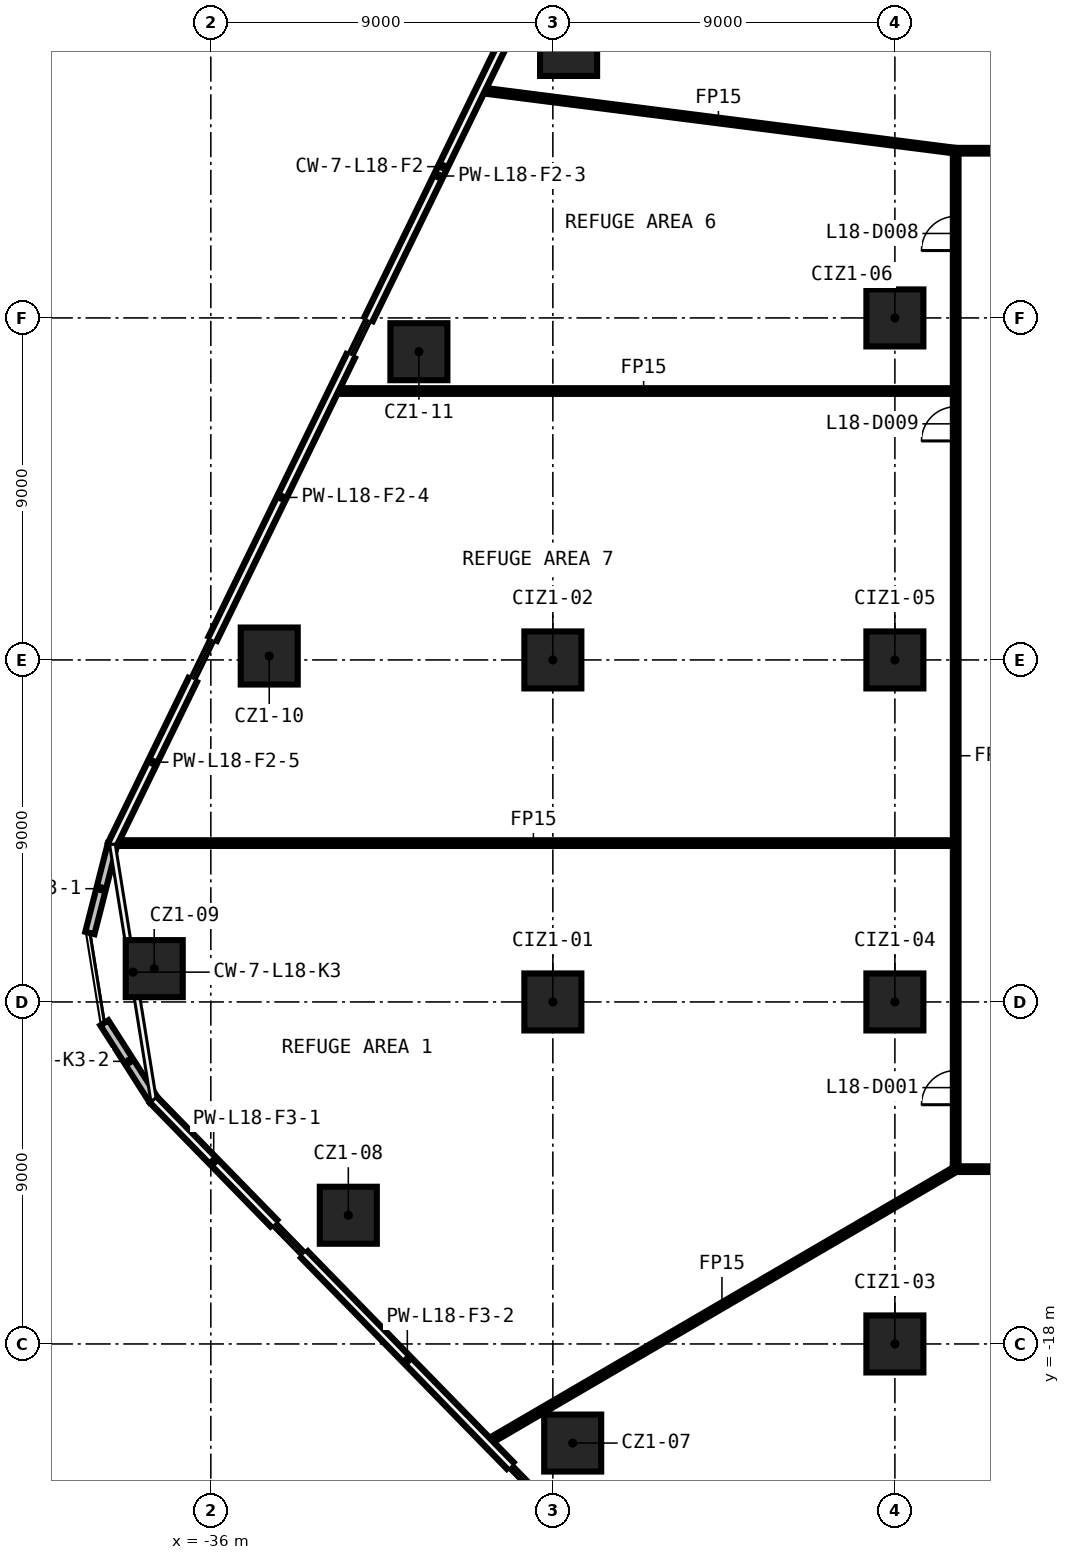
"""IFC4 building model, lengths in metres.
Left out: names, types, materials, properties, quantities, classifications, styles, units other than length and angle.
Written with IfcOpenShell. Run it as: python <this file> out.ifc"""

import sys

from ifc_helpers import new_model, si_unit, direction, frame, frame_2d, origin, origin_2d, place, context, subcontext, project, spatial, rectangle, extrude, element, fill, save


model = new_model("IFC4")
c1 = context("Model", 3, precision=1e-05, world=origin(), true_north=direction((0.0, 1.0)))
c2 = subcontext(c1, "Body", "Model", "MODEL_VIEW")
j1 = project(units=[si_unit("LENGTHUNIT", "METRE"), si_unit("PLANEANGLEUNIT", "RADIAN")], contexts=[c1])
p1 = place(None, origin())
s1 = spatial("IfcSite", under=j1, at=p1, CompositionType="ELEMENT")
p2 = place(p1, origin())
s2 = spatial("IfcBuilding", under=s1, at=p2, CompositionType="ELEMENT")
p3 = place(p2, frame((0.0, 0.0, 89.2)))
s3 = spatial("IfcBuildingStorey", under=s2, at=p3, CompositionType="ELEMENT", Elevation=89.2)
for number, where, z_axis, x_axis in (
    (1, (-26.478, -20.608, 0.0), (0.0, 0.0, 1.0), (1.0, 0.0, 0.0)),
    (2, (-32.382, -14.613, 0.0), (0.0, 0.0, 1.0), (1.0, 0.0, 0.0)),
    (3, (-37.489, -8.123, 0.0), (0.0, 0.0, 1.0), (1.0, 0.0, 0.0)),
    (4, (-34.463, 0.103, 0.0), (0.0, 0.0, 1.0), (1.0, 0.0, 0.0)),
    (5, (-30.525, 8.111, 0.0), (0.0, 0.0, 1.0), (1.0, 0.0, 0.0)),
    (6, (-26.586, 16.118, 0.0), (0.0, 0.0, 1.0), (1.0, 0.0, 0.0)),
    (7, (-27.0, -9.0, 0.0), (0.0, 0.0, 1.0), (1.0, 0.0, 0.0)),
    (8, (-27.0, 0.0, 0.0), (0.0, 0.0, 1.0), (1.0, 0.0, 0.0)),
    (9, (-18.0, -18.0, 0.0), (0.0, 0.0, 1.0), (1.0, 0.0, 0.0)),
    (10, (-18.0, -9.0, 0.0), (0.0, 0.0, 1.0), (1.0, 0.0, 0.0)),
    (11, (-18.0, 0.0, 0.0), (0.0, 0.0, 1.0), (1.0, 0.0, 0.0)),
    (12, (-18.0, 9.0, 0.0), (0.0, 0.0, 1.0), (1.0, 0.0, 0.0)),
):
    element("IfcColumn", number, at=place(p3, frame(where, z_axis=z_axis, x_axis=x_axis)), inside=s3, PredefinedType="COLUMN", context=c2, shape_type="SweptSolid", body=[
        extrude(rectangle(XDim=1.5, YDim=1.5, at=origin_2d()), origin(), (0.0, 0.0, 1.0), 5.55),
    ])
p4 = place(p3, frame((16.475, -13.4, 0.0), z_axis=(0.0, 0.0, 1.0), x_axis=(-1.0, 0.0, 0.0)))
e13 = element("IfcWall", 13, at=p4, inside=s3, PredefinedType="PARTITIONING", context=c2, shape_type="SweptSolid", body=[
    extrude(rectangle(XDim=32.95, YDim=0.15, at=frame_2d((16.475, 0.0))), origin(), (0.0, 0.0, 1.0), 5.55),
])
p5 = place(p4, frame((19.203, 0.0, 0.0)))
e14 = element("IfcOpeningElement", 14, at=p5, cuts=e13, PredefinedType="OPENING", context=c2, shape_type="SweptSolid", body=[
    extrude(rectangle(XDim=0.9, YDim=2.1, at=frame_2d((0.45, 1.05))), frame((0.0, 0.085, 0.0), z_axis=(0.0, -1.0, 0.0), x_axis=(1.0, 0.0, 0.0)), (0.0, 0.0, 1.0), 0.17),
])
p6 = place(p4, frame((2.192, 0.0, 0.0)))
e15 = element("IfcOpeningElement", 15, at=p6, cuts=e13, PredefinedType="OPENING", context=c2, shape_type="SweptSolid", body=[
    extrude(rectangle(XDim=0.9, YDim=2.1, at=frame_2d((0.45, 1.05))), frame((0.0, 0.085, 0.0), z_axis=(0.0, -1.0, 0.0), x_axis=(1.0, 0.0, 0.0)), (0.0, 0.0, 1.0), 0.17),
])
p7 = place(p3, frame((-38.55, -4.82, 0.0), z_axis=(0.0, 0.0, 1.0), x_axis=(1.0, 0.0, 0.0)))
e16 = element("IfcWall", 16, at=p7, inside=s3, PredefinedType="PARTITIONING", context=c2, shape_type="SweptSolid", body=[
    extrude(rectangle(XDim=22.075, YDim=0.15, at=frame_2d((11.037, 0.0))), origin(), (0.0, 0.0, 1.0), 5.55),
])
p8 = place(p3, frame((-32.748, 7.076, 0.0), z_axis=(0.0, 0.0, 1.0), x_axis=(1.0, 0.0, 0.0)))
e17 = element("IfcWall", 17, at=p8, inside=s3, PredefinedType="PARTITIONING", context=c2, shape_type="SweptSolid", body=[
    extrude(rectangle(XDim=16.273, YDim=0.15, at=frame_2d((8.137, 0.0))), origin(), (0.0, 0.0, 1.0), 5.55),
])
p9 = place(p3, frame((-16.475, 13.4, 0.0), z_axis=(0.0, 0.0, 1.0), x_axis=(1.0, 0.0, 0.0)))
e18 = element("IfcWall", 18, at=p9, inside=s3, PredefinedType="PARTITIONING", context=c2, shape_type="SweptSolid", body=[
    extrude(rectangle(XDim=32.95, YDim=0.15, at=frame_2d((16.475, 0.0))), origin(), (0.0, 0.0, 1.0), 5.55),
])
p10 = place(p9, frame((28.958, 0.0, 0.0)))
e19 = element("IfcOpeningElement", 19, at=p10, cuts=e18, PredefinedType="OPENING", context=c2, shape_type="SweptSolid", body=[
    extrude(rectangle(XDim=0.9, YDim=2.1, at=frame_2d((0.45, 1.05))), frame((0.0, 0.085, 0.0), z_axis=(0.0, -1.0, 0.0), x_axis=(1.0, 0.0, 0.0)), (0.0, 0.0, 1.0), 0.17),
])
p11 = place(p3, frame((-28.702, -20.577, 0.0), z_axis=(0.0, 0.0, 1.0), x_axis=(0.863745948182, 0.503927511652, 0.0)))
e20 = element("IfcWall", 20, at=p11, inside=s3, PredefinedType="PARTITIONING", context=c2, shape_type="SweptSolid", body=[
    extrude(rectangle(XDim=14.243, YDim=0.15, at=frame_2d((7.121, 0.0))), origin(), (0.0, 0.0, 1.0), 5.55),
])
p12 = place(p3, frame((-16.4, -13.325, 0.0), z_axis=(0.0, 0.0, 1.0), x_axis=(0.0, 1.0, 0.0)))
e21 = element("IfcWall", 21, at=p12, inside=s3, PredefinedType="PARTITIONING", context=c2, shape_type="SweptSolid", body=[
    extrude(rectangle(XDim=26.65, YDim=0.15, at=frame_2d((13.325, 0.0))), origin(), (0.0, 0.0, 1.0), 5.55),
])
p13 = place(p12, frame((1.621, 0.0, 0.0)))
e22 = element("IfcOpeningElement", 22, at=p13, cuts=e21, PredefinedType="OPENING", context=c2, shape_type="SweptSolid", body=[
    extrude(rectangle(XDim=0.9, YDim=2.1, at=frame_2d((0.45, 1.05))), frame((0.0, 0.085, 0.0), z_axis=(0.0, -1.0, 0.0), x_axis=(1.0, 0.0, 0.0)), (0.0, 0.0, 1.0), 0.17),
])
p14 = place(p12, frame((24.098, 0.0, 0.0)))
e23 = element("IfcOpeningElement", 23, at=p14, cuts=e21, PredefinedType="OPENING", context=c2, shape_type="SweptSolid", body=[
    extrude(rectangle(XDim=0.9, YDim=2.1, at=frame_2d((0.45, 1.05))), frame((0.0, 0.085, 0.0), z_axis=(0.0, -1.0, 0.0), x_axis=(1.0, 0.0, 0.0)), (0.0, 0.0, 1.0), 0.17),
])
p15 = place(p12, frame((19.088, 0.0, 0.0)))
e24 = element("IfcOpeningElement", 24, at=p15, cuts=e21, PredefinedType="OPENING", context=c2, shape_type="SweptSolid", body=[
    extrude(rectangle(XDim=0.9, YDim=2.1, at=frame_2d((0.45, 1.05))), frame((0.0, 0.085, 0.0), z_axis=(0.0, -1.0, 0.0), x_axis=(1.0, 0.0, 0.0)), (0.0, 0.0, 1.0), 0.17),
])
p16 = place(p3, frame((-28.888, 14.991, 0.0), z_axis=(0.0, 0.0, 1.0), x_axis=(0.991981829528, -0.126380575588, 0.0)))
e25 = element("IfcWall", 25, at=p16, inside=s3, PredefinedType="PARTITIONING", context=c2, shape_type="SweptSolid", body=[
    extrude(rectangle(XDim=12.589, YDim=0.15, at=frame_2d((6.295, 0.0))), origin(), (0.0, 0.0, 1.0), 5.55),
])
p17 = place(p3, frame((-28.175, 16.5, 0.0), z_axis=(0.0, 0.0, 1.0), x_axis=(-0.438332337133, -0.898812973996, 0.0)))
e26 = element("IfcWall", 26, at=p17, inside=s3, PredefinedType="SOLIDWALL", context=c2, shape_type="SweptSolid", body=[
    extrude(rectangle(XDim=8.377, YDim=0.25, at=frame_2d((4.189, 0.0))), origin(), (0.0, 0.0, 1.0), 5.55),
])
p18 = place(p3, frame((-32.322, 7.996, 0.0), z_axis=(0.0, 0.0, 1.0), x_axis=(-0.438317846938, -0.898820040417, 0.0)))
e27 = element("IfcWall", 27, at=p18, inside=s3, PredefinedType="SOLIDWALL", context=c2, shape_type="SweptSolid", body=[
    extrude(rectangle(XDim=8.276, YDim=0.25, at=frame_2d((4.138, 0.0))), origin(), (0.0, 0.0, 1.0), 5.55),
])
p19 = place(p3, frame((-36.478, -0.526, 0.0), z_axis=(0.0, 0.0, 1.0), x_axis=(-0.43835071994, -0.898804008852, 0.0)))
e28 = element("IfcWall", 28, at=p19, inside=s3, PredefinedType="SOLIDWALL", context=c2, shape_type="SweptSolid", body=[
    extrude(rectangle(XDim=4.816, YDim=0.25, at=frame_2d((2.408, 0.0))), origin(), (0.0, 0.0, 1.0), 5.55),
])
for number, where, z_axis, x_axis in (
    (29, (-38.589, -4.855, 0.0), (0.0, 0.0, 1.0), (-0.247, -0.969, 0.0)),
    (30, (-38.802, -9.55, 0.0), (0.0, 0.0, 1.0), (0.538, -0.843, 0.0)),
):
    element("IfcWall", number, at=place(p3, frame(where, z_axis=z_axis, x_axis=x_axis)), inside=s3, PredefinedType="SOLIDWALL", context=c2, shape_type="SweptSolid", body=[
        extrude(rectangle(XDim=2.405, YDim=0.25, at=frame_2d((1.203, 0.0))), origin(), (0.0, 0.0, 1.0), 5.55),
    ])
p20 = place(p3, frame((-37.507, -11.577, 0.0), z_axis=(0.0, 0.0, 1.0), x_axis=(0.698192615828, -0.715909960263, 0.0)))
e31 = element("IfcWall", 31, at=p20, inside=s3, PredefinedType="SOLIDWALL", context=c2, shape_type="SweptSolid", body=[
    extrude(rectangle(XDim=4.533, YDim=0.25, at=frame_2d((2.267, 0.0))), origin(), (0.0, 0.0, 1.0), 5.55),
])
p21 = place(p3, frame((-33.536, -15.649, 0.0), z_axis=(0.0, 0.0, 1.0), x_axis=(0.698186501695, -0.715915923032, 0.0)))
e32 = element("IfcWall", 32, at=p21, inside=s3, PredefinedType="SOLIDWALL", context=c2, shape_type="SweptSolid", body=[
    extrude(rectangle(XDim=7.753, YDim=0.25, at=frame_2d((3.876, 0.0))), origin(), (0.0, 0.0, 1.0), 5.55),
])
p22 = place(p13, origin())
e33 = element("IfcDoor", 33, at=p22, inside=s3, OperationType="SINGLE_SWING_RIGHT", PredefinedType="DOOR", context=c2, shape_type="SweptSolid", body=[
    extrude(rectangle(XDim=0.9, YDim=2.1, at=frame_2d((0.45, 1.05))), frame((0.0, 0.025, 0.0), z_axis=(0.0, -1.0, 0.0), x_axis=(1.0, 0.0, 0.0)), (0.0, 0.0, 1.0), 0.05),
])
fill(e22, e33)
p23 = place(p14, origin())
e34 = element("IfcDoor", 34, at=p23, inside=s3, OperationType="SINGLE_SWING_LEFT", PredefinedType="DOOR", context=c2, shape_type="SweptSolid", body=[
    extrude(rectangle(XDim=0.9, YDim=2.1, at=frame_2d((0.45, 1.05))), frame((0.0, 0.025, 0.0), z_axis=(0.0, -1.0, 0.0), x_axis=(1.0, 0.0, 0.0)), (0.0, 0.0, 1.0), 0.05),
])
fill(e23, e34)
p24 = place(p15, origin())
e35 = element("IfcDoor", 35, at=p24, inside=s3, OperationType="SINGLE_SWING_RIGHT", PredefinedType="DOOR", context=c2, shape_type="SweptSolid", body=[
    extrude(rectangle(XDim=0.9, YDim=2.1, at=frame_2d((0.45, 1.05))), frame((0.0, 0.025, 0.0), z_axis=(0.0, -1.0, 0.0), x_axis=(1.0, 0.0, 0.0)), (0.0, 0.0, 1.0), 0.05),
])
fill(e24, e35)
save(model, sys.argv[1])
